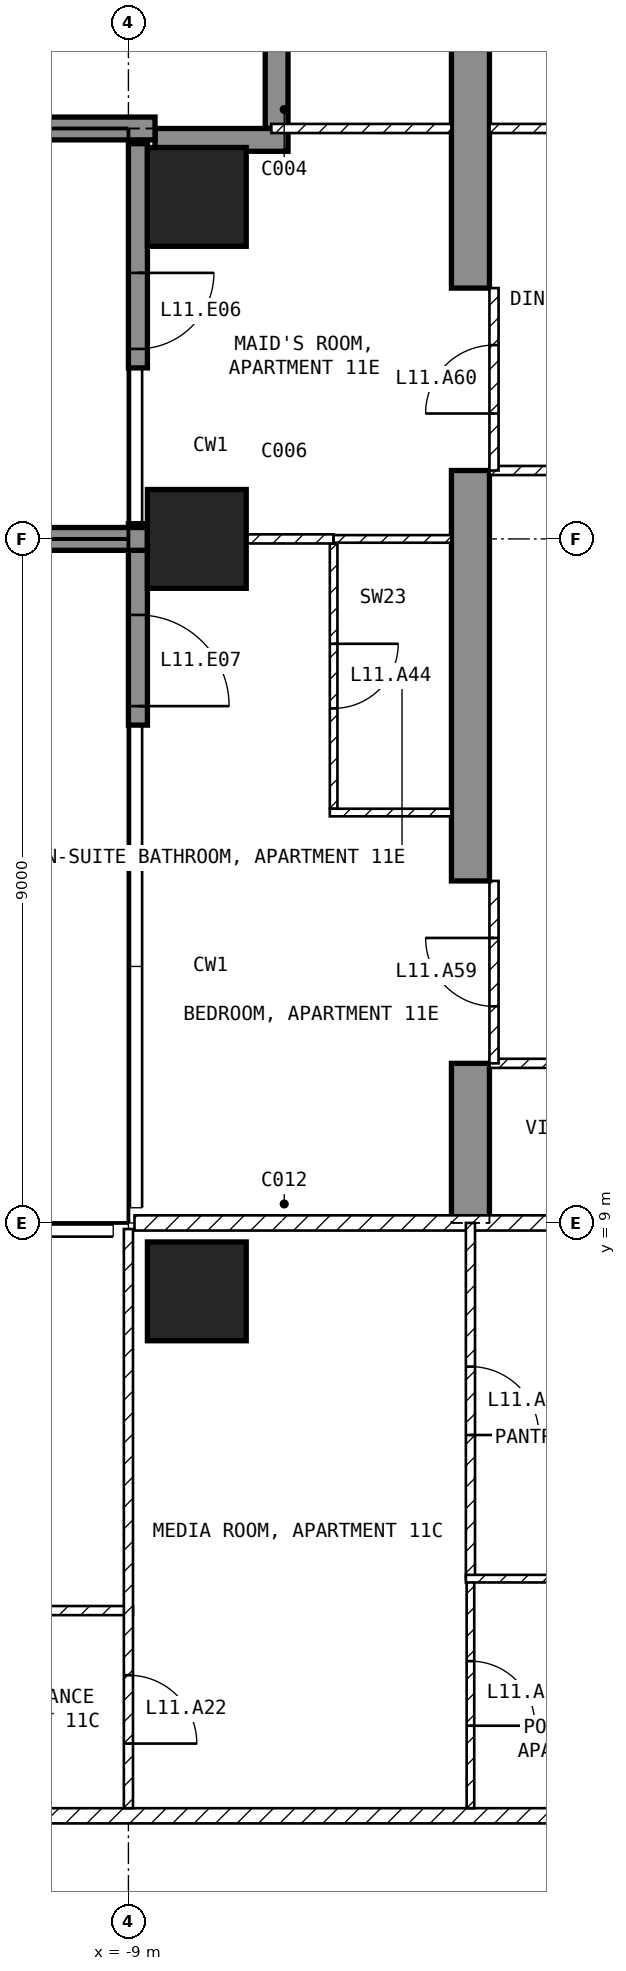
"""IFC4 building model, lengths in metres.
Left out: names, types, materials, properties, quantities, classifications, styles, units other than length and angle.
Written with IfcOpenShell. Run it as: python <this file> out.ifc"""

import sys

from ifc_helpers import new_model, si_unit, direction, frame, frame_2d, origin, origin_2d, place, context, subcontext, project, spatial, polyline, rectangle, outline, extrude, element, fill, save


model = new_model("IFC4")
c1 = context("Model", 3, precision=1e-05, world=origin(), true_north=direction((0.0, 1.0)))
c2 = subcontext(c1, "Body", "Model", "MODEL_VIEW")
j1 = project(units=[si_unit("LENGTHUNIT", "METRE"), si_unit("PLANEANGLEUNIT", "RADIAN")], contexts=[c1])
p1 = place(None, origin())
s1 = spatial("IfcSite", under=j1, at=p1, CompositionType="ELEMENT")
p2 = place(p1, origin())
s2 = spatial("IfcBuilding", under=s1, at=p2, CompositionType="ELEMENT")
p3 = place(p2, frame((0.0, 0.0, 57.5)))
s3 = spatial("IfcBuildingStorey", under=s2, at=p3, CompositionType="ELEMENT", Elevation=57.5)
for number, where, z_axis, x_axis in (
    (1, (-8.1, 8.1, -0.25), (0.0, 0.0, 1.0), (1.0, 0.0, 0.0)),
    (2, (-8.1, 18.0, -0.25), (0.0, 0.0, 1.0), (1.0, 0.0, 0.0)),
    (3, (-8.1, 22.5, -0.25), (0.0, 0.0, 1.0), (1.0, 0.0, 0.0)),
):
    element("IfcColumn", number, at=place(p3, frame(where, z_axis=z_axis, x_axis=x_axis)), inside=s3, PredefinedType="COLUMN", context=c2, shape_type="SweptSolid", body=[
        extrude(rectangle(XDim=1.3, YDim=1.3, at=origin_2d()), origin(), (0.0, 0.0, 1.0), 3.5),
    ])
p4 = place(p3, frame((-4.75, 9.0, -0.25), z_axis=(1.0, 0.0, 0.0), x_axis=(0.0, 1.0, 0.0)))
e4 = element("IfcWall", 4, at=p4, inside=s3, PredefinedType="SHEAR", context=c2, shape_type="SweptSolid", body=[
    extrude(outline(polyline([(0.0, 0.0), (2.1, 0.0), (2.1, 2.65), (4.5, 2.65), (4.5, 0.0), (9.9, 0.0), (9.9, 2.65), (12.3, 2.65), (12.3, 0.0), (16.45, 0.0), (16.45, 3.5), (0.0, 3.5), (0.0, 0.0)])), origin(), (0.0, 0.0, 1.0), 0.5),
])
p5 = place(p3, frame((-8.875, 23.2, 0.0), z_axis=(0.0, 0.0, 1.0), x_axis=(0.0, -1.0, 0.0)))
e5 = element("IfcWall", 5, at=p5, inside=s3, PredefinedType="SOLIDWALL", context=c2, shape_type="SweptSolid", body=[
    extrude(rectangle(XDim=2.95, YDim=0.25, at=frame_2d((1.475, 0.0))), origin(), (0.0, 0.0, 1.0), 3.25),
])
p6 = place(p5, frame((1.7, 0.0, 0.0)))
e6 = element("IfcOpeningElement", 6, at=p6, cuts=e5, PredefinedType="OPENING", context=c2, shape_type="SweptSolid", body=[
    extrude(rectangle(XDim=1.0, YDim=2.4, at=frame_2d((0.5, 1.2))), frame((0.0, 0.135, 0.0), z_axis=(0.0, -1.0, 0.0), x_axis=(1.0, 0.0, 0.0)), (0.0, 0.0, 1.0), 0.27),
])
p7 = place(p3, frame((-8.875, 18.2, 0.0), z_axis=(0.0, 0.0, 1.0), x_axis=(0.0, -1.0, 0.0)))
e7 = element("IfcWall", 7, at=p7, inside=s3, PredefinedType="SOLIDWALL", context=c2, shape_type="SweptSolid", body=[
    extrude(rectangle(XDim=2.65, YDim=0.25, at=frame_2d((1.325, 0.0))), origin(), (0.0, 0.0, 1.0), 3.25),
])
p8 = place(p7, frame((1.2, 0.0, 0.0)))
e8 = element("IfcOpeningElement", 8, at=p8, cuts=e7, PredefinedType="OPENING", context=c2, shape_type="SweptSolid", body=[
    extrude(rectangle(XDim=1.2, YDim=2.4, at=frame_2d((0.6, 1.2))), frame((0.0, 0.135, 0.0), z_axis=(0.0, -1.0, 0.0), x_axis=(1.0, 0.0, 0.0)), (0.0, 0.0, 1.0), 0.27),
])
p9 = place(p3, frame((-7.05, 25.2, 0.0), z_axis=(0.0, 0.0, 1.0), x_axis=(0.0, -1.0, 0.0)))
e9 = element("IfcWall", 9, at=p9, inside=s3, PredefinedType="SOLIDWALL", context=c2, shape_type="SweptSolid", body=[
    extrude(rectangle(XDim=1.8, YDim=0.3, at=frame_2d((0.9, 0.0))), origin(), (0.0, 0.0, 1.0), 3.25),
])
p10 = place(p3, frame((-6.9, 23.25, 0.0), z_axis=(0.0, 0.0, 1.0), x_axis=(-1.0, 0.0, 0.0)))
e10 = element("IfcWall", 10, at=p10, inside=s3, PredefinedType="SOLIDWALL", context=c2, shape_type="SweptSolid", body=[
    extrude(rectangle(XDim=1.75, YDim=0.3, at=frame_2d((0.875, 0.0))), origin(), (0.0, 0.0, 1.0), 3.25),
])
p11 = place(p3, frame((-8.75, 18.0, 0.0), z_axis=(0.0, 0.0, 1.0), x_axis=(-1.0, 0.0, 0.0)))
e11 = element("IfcWall", 11, at=p11, inside=s3, PredefinedType="SOLIDWALL", context=c2, shape_type="SweptSolid", body=[
    extrude(rectangle(XDim=2.95, YDim=0.3, at=frame_2d((1.475, 0.0))), origin(), (0.0, 0.0, 1.0), 3.25),
])
p12 = place(p3, frame((-8.65, 23.4, 0.0), z_axis=(0.0, 0.0, 1.0), x_axis=(-1.0, 0.0, 0.0)))
e12 = element("IfcWall", 12, at=p12, inside=s3, PredefinedType="SOLIDWALL", context=c2, shape_type="SweptSolid", body=[
    extrude(rectangle(XDim=3.05, YDim=0.3, at=frame_2d((1.525, 0.0))), origin(), (0.0, 0.0, 1.0), 3.25),
])
p13 = place(p3, frame((-21.6, 1.2, 0.0), z_axis=(0.0, 0.0, 1.0), x_axis=(1.0, 0.0, 0.0)))
e13 = element("IfcWall", 13, at=p13, inside=s3, PredefinedType="PARTITIONING", context=c2, shape_type="SweptSolid", body=[
    extrude(rectangle(XDim=20.5, YDim=0.2, at=frame_2d((10.25, 0.0))), origin(), (0.0, 0.0, 1.0), 3.25),
])
p14 = place(p13, frame((10.3, 0.0, 0.0)))
e14 = element("IfcOpeningElement", 14, at=p14, cuts=e13, PredefinedType="OPENING", context=c2, shape_type="SweptSolid", body=[
    extrude(rectangle(XDim=1.0, YDim=2.1, at=frame_2d((0.5, 1.05))), frame((0.0, 0.11, 0.0), z_axis=(0.0, -1.0, 0.0), x_axis=(1.0, 0.0, 0.0)), (0.0, 0.0, 1.0), 0.22),
])
p15 = place(p3, frame((-8.92, 9.0, 0.0), z_axis=(0.0, 0.0, 1.0), x_axis=(1.0, 0.0, 0.0)))
e15 = element("IfcWall", 15, at=p15, inside=s3, PredefinedType="PARTITIONING", context=c2, shape_type="SweptSolid", body=[
    extrude(rectangle(XDim=17.84, YDim=0.2, at=frame_2d((8.92, 0.0))), origin(), (0.0, 0.0, 1.0), 3.25),
])
p16 = place(p15, frame((8.42, 0.0, 0.0)))
e16 = element("IfcOpeningElement", 16, at=p16, cuts=e15, PredefinedType="OPENING", context=c2, shape_type="SweptSolid", body=[
    extrude(rectangle(XDim=1.0, YDim=2.1, at=frame_2d((0.5, 1.05))), frame((0.0, 0.11, 0.0), z_axis=(0.0, -1.0, 0.0), x_axis=(1.0, 0.0, 0.0)), (0.0, 0.0, 1.0), 0.22),
])
p17 = place(p3, frame((-17.4, 3.9, 0.0), z_axis=(0.0, 0.0, 1.0), x_axis=(1.0, 0.0, 0.0)))
e17 = element("IfcWall", 17, at=p17, inside=s3, PredefinedType="PARTITIONING", context=c2, shape_type="SweptSolid", body=[
    extrude(rectangle(XDim=8.46, YDim=0.12, at=frame_2d((4.23, 0.0))), origin(), (0.0, 0.0, 1.0), 3.25),
])
p18 = place(p17, frame((0.45, 0.0, 0.0)))
e18 = element("IfcOpeningElement", 18, at=p18, cuts=e17, PredefinedType="OPENING", context=c2, shape_type="SweptSolid", body=[
    extrude(rectangle(XDim=0.9, YDim=2.1, at=frame_2d((0.45, 1.05))), frame((0.0, 0.07, 0.0), z_axis=(0.0, -1.0, 0.0), x_axis=(1.0, 0.0, 0.0)), (0.0, 0.0, 1.0), 0.14),
])
p19 = place(p17, frame((6.15, 0.0, 0.0)))
e19 = element("IfcOpeningElement", 19, at=p19, cuts=e17, PredefinedType="OPENING", context=c2, shape_type="SweptSolid", body=[
    extrude(rectangle(XDim=0.9, YDim=2.1, at=frame_2d((0.45, 1.05))), frame((0.0, 0.07, 0.0), z_axis=(0.0, -1.0, 0.0), x_axis=(1.0, 0.0, 0.0)), (0.0, 0.0, 1.0), 0.14),
])
p20 = place(p3, frame((-9.0, 8.92, 0.0), z_axis=(0.0, 0.0, 1.0), x_axis=(0.0, -1.0, 0.0)))
e20 = element("IfcWall", 20, at=p20, inside=s3, PredefinedType="PARTITIONING", context=c2, shape_type="SweptSolid", body=[
    extrude(rectangle(XDim=7.62, YDim=0.12, at=frame_2d((3.81, 0.0))), origin(), (0.0, 0.0, 1.0), 3.25),
])
p21 = place(p20, frame((5.87, 0.0, 0.0)))
e21 = element("IfcOpeningElement", 21, at=p21, cuts=e20, PredefinedType="OPENING", context=c2, shape_type="SweptSolid", body=[
    extrude(rectangle(XDim=0.9, YDim=2.1, at=frame_2d((0.45, 1.05))), frame((0.0, 0.07, 0.0), z_axis=(0.0, -1.0, 0.0), x_axis=(1.0, 0.0, 0.0)), (0.0, 0.0, 1.0), 0.14),
])
p22 = place(p3, frame((-4.5, 4.32, 0.0), z_axis=(0.0, 0.0, 1.0), x_axis=(0.0, -1.0, 0.0)))
e22 = element("IfcWall", 22, at=p22, inside=s3, PredefinedType="PARTITIONING", context=c2, shape_type="SweptSolid", body=[
    extrude(rectangle(XDim=3.02, YDim=0.1, at=frame_2d((1.51, 0.0))), origin(), (0.0, 0.0, 1.0), 3.25),
])
p23 = place(p22, frame((1.085, 0.0, 0.0)))
e23 = element("IfcOpeningElement", 23, at=p23, cuts=e22, PredefinedType="OPENING", context=c2, shape_type="SweptSolid", body=[
    extrude(rectangle(XDim=0.85, YDim=2.1, at=frame_2d((0.425, 1.05))), frame((0.0, 0.06, 0.0), z_axis=(0.0, -1.0, 0.0), x_axis=(1.0, 0.0, 0.0)), (0.0, 0.0, 1.0), 0.12),
])
p24 = place(p3, frame((-4.5, 9.0, 0.0), z_axis=(0.0, 0.0, 1.0), x_axis=(0.0, -1.0, 0.0)))
e24 = element("IfcWall", 24, at=p24, inside=s3, PredefinedType="PARTITIONING", context=c2, shape_type="SweptSolid", body=[
    extrude(rectangle(XDim=4.68, YDim=0.12, at=frame_2d((2.34, 0.0))), origin(), (0.0, 0.0, 1.0), 3.25),
])
p25 = place(p24, frame((1.89, 0.0, 0.0)))
e25 = element("IfcOpeningElement", 25, at=p25, cuts=e24, PredefinedType="OPENING", context=c2, shape_type="SweptSolid", body=[
    extrude(rectangle(XDim=0.9, YDim=2.1, at=frame_2d((0.45, 1.05))), frame((0.0, 0.07, 0.0), z_axis=(0.0, -1.0, 0.0), x_axis=(1.0, 0.0, 0.0)), (0.0, 0.0, 1.0), 0.14),
])
p26 = place(p3, frame((-4.56, 4.32, 0.0), z_axis=(0.0, 0.0, 1.0), x_axis=(1.0, 0.0, 0.0)))
e26 = element("IfcWall", 26, at=p26, inside=s3, PredefinedType="PARTITIONING", context=c2, shape_type="SweptSolid", body=[
    extrude(rectangle(XDim=3.46, YDim=0.1, at=frame_2d((1.73, 0.0))), origin(), (0.0, 0.0, 1.0), 3.25),
])
p27 = place(p3, frame((-4.25, 11.1, 0.0), z_axis=(0.0, 0.0, 1.0), x_axis=(1.0, 0.0, 0.0)))
e27 = element("IfcWall", 27, at=p27, inside=s3, PredefinedType="PARTITIONING", context=c2, shape_type="SweptSolid", body=[
    extrude(rectangle(XDim=6.35, YDim=0.12, at=frame_2d((3.175, 0.0))), origin(), (0.0, 0.0, 1.0), 3.25),
])
p28 = place(p27, frame((2.725, 0.0, 0.0)))
e28 = element("IfcOpeningElement", 28, at=p28, cuts=e27, PredefinedType="OPENING", context=c2, shape_type="SweptSolid", body=[
    extrude(rectangle(XDim=0.9, YDim=2.1, at=frame_2d((0.45, 1.05))), frame((0.0, 0.07, 0.0), z_axis=(0.0, -1.0, 0.0), x_axis=(1.0, 0.0, 0.0)), (0.0, 0.0, 1.0), 0.14),
])
p29 = place(p3, frame((-4.25, 18.9, 0.0), z_axis=(0.0, 0.0, 1.0), x_axis=(1.0, 0.0, 0.0)))
e29 = element("IfcWall", 29, at=p29, inside=s3, PredefinedType="PARTITIONING", context=c2, shape_type="SweptSolid", body=[
    extrude(rectangle(XDim=8.5, YDim=0.12, at=frame_2d((4.25, 0.0))), origin(), (0.0, 0.0, 1.0), 3.25),
])
p30 = place(p29, frame((1.925, 0.0, 0.0)))
e30 = element("IfcOpeningElement", 30, at=p30, cuts=e29, PredefinedType="OPENING", context=c2, shape_type="SweptSolid", body=[
    extrude(rectangle(XDim=0.9, YDim=2.1, at=frame_2d((0.45, 1.05))), frame((0.0, 0.07, 0.0), z_axis=(0.0, -1.0, 0.0), x_axis=(1.0, 0.0, 0.0)), (0.0, 0.0, 1.0), 0.14),
])
p31 = place(p3, frame((-4.25, 23.4, 0.0), z_axis=(0.0, 0.0, 1.0), x_axis=(1.0, 0.0, 0.0)))
e31 = element("IfcWall", 31, at=p31, inside=s3, PredefinedType="PARTITIONING", context=c2, shape_type="SweptSolid", body=[
    extrude(rectangle(XDim=8.5, YDim=0.12, at=frame_2d((4.25, 0.0))), origin(), (0.0, 0.0, 1.0), 3.25),
])
p32 = place(p31, frame((1.925, 0.0, 0.0)))
e32 = element("IfcOpeningElement", 32, at=p32, cuts=e31, PredefinedType="OPENING", context=c2, shape_type="SweptSolid", body=[
    extrude(rectangle(XDim=0.9, YDim=2.1, at=frame_2d((0.45, 1.05))), frame((0.0, 0.07, 0.0), z_axis=(0.0, -1.0, 0.0), x_axis=(1.0, 0.0, 0.0)), (0.0, 0.0, 1.0), 0.14),
])
p33 = place(p3, frame((-6.3, 17.94, 0.0), z_axis=(0.0, 0.0, 1.0), x_axis=(0.0, -1.0, 0.0)))
e33 = element("IfcWall", 33, at=p33, inside=s3, PredefinedType="PARTITIONING", context=c2, shape_type="SweptSolid", body=[
    extrude(rectangle(XDim=3.49, YDim=0.1, at=frame_2d((1.745, 0.0))), origin(), (0.0, 0.0, 1.0), 3.25),
])
p34 = place(p33, frame((1.32, 0.0, 0.0)))
e34 = element("IfcOpeningElement", 34, at=p34, cuts=e33, PredefinedType="OPENING", context=c2, shape_type="SweptSolid", body=[
    extrude(rectangle(XDim=0.85, YDim=2.1, at=frame_2d((0.425, 1.05))), frame((0.0, 0.06, 0.0), z_axis=(0.0, -1.0, 0.0), x_axis=(1.0, 0.0, 0.0)), (0.0, 0.0, 1.0), 0.12),
])
p35 = place(p3, frame((-6.35, 14.4, 0.0), z_axis=(0.0, 0.0, 1.0), x_axis=(1.0, 0.0, 0.0)))
e35 = element("IfcWall", 35, at=p35, inside=s3, PredefinedType="PARTITIONING", context=c2, shape_type="SweptSolid", body=[
    extrude(rectangle(XDim=1.6, YDim=0.1, at=frame_2d((0.8, 0.0))), origin(), (0.0, 0.0, 1.0), 3.25),
])
p36 = place(p3, frame((-7.45, 18.0, 0.0), z_axis=(0.0, 0.0, 1.0), x_axis=(1.0, 0.0, 0.0)))
e36 = element("IfcWall", 36, at=p36, inside=s3, PredefinedType="PARTITIONING", context=c2, shape_type="SweptSolid", body=[
    extrude(rectangle(XDim=1.15, YDim=0.12, at=frame_2d((0.575, 0.0))), origin(), (0.0, 0.0, 1.0), 2.346),
])
p37 = place(p3, frame((-6.3, 18.0, 0.0), z_axis=(0.0, 0.0, 1.0), x_axis=(1.0, 0.0, 0.0)))
e37 = element("IfcWall", 37, at=p37, inside=s3, PredefinedType="PARTITIONING", context=c2, shape_type="SweptSolid", body=[
    extrude(rectangle(XDim=1.55, YDim=0.1, at=frame_2d((0.775, 0.0))), origin(), (0.0, 0.0, 1.0), 2.346),
])
p38 = place(p3, frame((-7.12, 23.4, 0.0), z_axis=(0.0, 0.0, 1.0), x_axis=(1.0, 0.0, 0.0)))
e38 = element("IfcWall", 38, at=p38, inside=s3, PredefinedType="PARTITIONING", context=c2, shape_type="SweptSolid", body=[
    extrude(rectangle(XDim=2.37, YDim=0.12, at=frame_2d((1.185, 0.0))), origin(), (0.0, 0.0, 1.0), 3.25),
])
p39 = place(p3, frame((-4.19, 11.1, 0.0), z_axis=(0.0, 0.0, 1.0), x_axis=(0.0, 1.0, 0.0)))
e39 = element("IfcWall", 39, at=p39, inside=s3, PredefinedType="PARTITIONING", context=c2, shape_type="SweptSolid", body=[
    extrude(rectangle(XDim=2.4, YDim=0.12, at=frame_2d((1.2, 0.0))), origin(), (0.0, 0.0, 1.0), 2.4),
])
p40 = place(p39, frame((0.75, 0.0, 0.0)))
e40 = element("IfcOpeningElement", 40, at=p40, cuts=e39, PredefinedType="OPENING", context=c2, shape_type="SweptSolid", body=[
    extrude(rectangle(XDim=0.9, YDim=2.1, at=frame_2d((0.45, 1.05))), frame((0.0, 0.07, 0.0), z_axis=(0.0, -1.0, 0.0), x_axis=(1.0, 0.0, 0.0)), (0.0, 0.0, 1.0), 0.14),
])
p41 = place(p3, frame((-4.19, 18.9, 0.0), z_axis=(0.0, 0.0, 1.0), x_axis=(0.0, 1.0, 0.0)))
e41 = element("IfcWall", 41, at=p41, inside=s3, PredefinedType="PARTITIONING", context=c2, shape_type="SweptSolid", body=[
    extrude(rectangle(XDim=2.4, YDim=0.12, at=frame_2d((1.2, 0.0))), origin(), (0.0, 0.0, 1.0), 2.4),
])
p42 = place(p41, frame((0.75, 0.0, 0.0)))
e42 = element("IfcOpeningElement", 42, at=p42, cuts=e41, PredefinedType="OPENING", context=c2, shape_type="SweptSolid", body=[
    extrude(rectangle(XDim=0.9, YDim=2.1, at=frame_2d((0.45, 1.05))), frame((0.0, 0.07, 0.0), z_axis=(0.0, -1.0, 0.0), x_axis=(1.0, 0.0, 0.0)), (0.0, 0.0, 1.0), 0.14),
])
p43 = place(p6, origin())
e43 = element("IfcDoor", 43, at=p43, inside=s3, OperationType="SINGLE_SWING_LEFT", PredefinedType="DOOR", context=c2, shape_type="SweptSolid", body=[
    extrude(rectangle(XDim=1.0, YDim=2.4, at=frame_2d((0.5, 1.2))), frame((0.0, 0.025, 0.0), z_axis=(0.0, -1.0, 0.0), x_axis=(1.0, 0.0, 0.0)), (0.0, 0.0, 1.0), 0.05),
])
fill(e6, e43)
p44 = place(p8, origin())
e44 = element("IfcDoor", 44, at=p44, inside=s3, OperationType="SINGLE_SWING_RIGHT", PredefinedType="DOOR", context=c2, shape_type="SweptSolid", body=[
    extrude(rectangle(XDim=1.2, YDim=2.4, at=frame_2d((0.6, 1.2))), frame((0.0, 0.025, 0.0), z_axis=(0.0, -1.0, 0.0), x_axis=(1.0, 0.0, 0.0)), (0.0, 0.0, 1.0), 0.05),
])
fill(e8, e44)
p45 = place(p21, origin())
e45 = element("IfcDoor", 45, at=p45, inside=s3, OperationType="SINGLE_SWING_RIGHT", PredefinedType="DOOR", context=c2, shape_type="SweptSolid", body=[
    extrude(rectangle(XDim=0.9, YDim=2.1, at=frame_2d((0.45, 1.05))), frame((0.0, 0.025, 0.0), z_axis=(0.0, -1.0, 0.0), x_axis=(1.0, 0.0, 0.0)), (0.0, 0.0, 1.0), 0.05),
])
fill(e21, e45)
p46 = place(p25, origin())
e46 = element("IfcDoor", 46, at=p46, inside=s3, OperationType="SINGLE_SWING_RIGHT", PredefinedType="DOOR", context=c2, shape_type="SweptSolid", body=[
    extrude(rectangle(XDim=0.9, YDim=2.1, at=frame_2d((0.45, 1.05))), frame((0.0, 0.025, 0.0), z_axis=(0.0, -1.0, 0.0), x_axis=(1.0, 0.0, 0.0)), (0.0, 0.0, 1.0), 0.05),
])
fill(e25, e46)
p47 = place(p23, origin())
e47 = element("IfcDoor", 47, at=p47, inside=s3, OperationType="SINGLE_SWING_RIGHT", PredefinedType="DOOR", context=c2, shape_type="SweptSolid", body=[
    extrude(rectangle(XDim=0.85, YDim=2.1, at=frame_2d((0.425, 1.05))), frame((0.0, 0.025, 0.0), z_axis=(0.0, -1.0, 0.0), x_axis=(1.0, 0.0, 0.0)), (0.0, 0.0, 1.0), 0.05),
])
fill(e23, e47)
p48 = place(p34, origin())
e48 = element("IfcDoor", 48, at=p48, inside=s3, OperationType="SINGLE_SWING_LEFT", PredefinedType="DOOR", context=c2, shape_type="SweptSolid", body=[
    extrude(rectangle(XDim=0.85, YDim=2.1, at=frame_2d((0.425, 1.05))), frame((0.0, 0.025, 0.0), z_axis=(0.0, -1.0, 0.0), x_axis=(1.0, 0.0, 0.0)), (0.0, 0.0, 1.0), 0.05),
])
fill(e34, e48)
p49 = place(p40, origin())
e49 = element("IfcDoor", 49, at=p49, inside=s3, OperationType="SINGLE_SWING_RIGHT", PredefinedType="DOOR", context=c2, shape_type="SweptSolid", body=[
    extrude(rectangle(XDim=0.9, YDim=2.1, at=frame_2d((0.45, 1.05))), frame((0.0, 0.025, 0.0), z_axis=(0.0, -1.0, 0.0), x_axis=(1.0, 0.0, 0.0)), (0.0, 0.0, 1.0), 0.05),
])
fill(e40, e49)
p50 = place(p42, origin())
e50 = element("IfcDoor", 50, at=p50, inside=s3, OperationType="SINGLE_SWING_LEFT", PredefinedType="DOOR", context=c2, shape_type="SweptSolid", body=[
    extrude(rectangle(XDim=0.9, YDim=2.1, at=frame_2d((0.45, 1.05))), frame((0.0, 0.025, 0.0), z_axis=(0.0, -1.0, 0.0), x_axis=(1.0, 0.0, 0.0)), (0.0, 0.0, 1.0), 0.05),
])
fill(e42, e50)
save(model, sys.argv[1])
